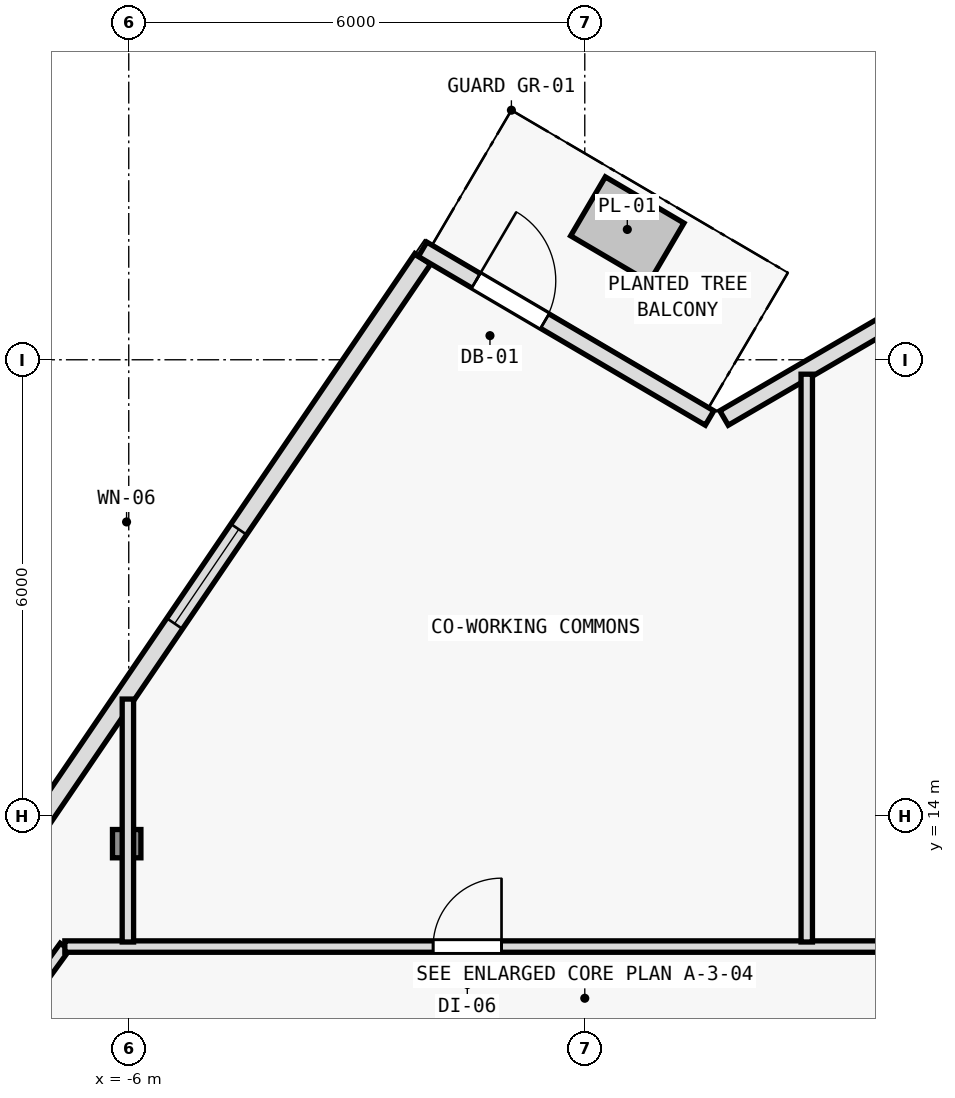
"""IFC4 building model, lengths in metres.
Left out: names, types, materials, properties, quantities, classifications, styles, units other than length and angle.
Written with IfcOpenShell. Run it as: python <this file> out.ifc"""

import sys

from ifc_helpers import new_model, si_unit, direction, frame, frame_2d, origin, origin_2d, place, context, subcontext, project, spatial, rectangle, i_section, extrude, element, fill, save


model = new_model("IFC4")
c1 = context("Model", 3, precision=1e-05, world=origin(), true_north=direction((0.0, 1.0)))
c2 = subcontext(c1, "Body", "Model", "MODEL_VIEW")
j1 = project(units=[si_unit("LENGTHUNIT", "METRE"), si_unit("PLANEANGLEUNIT", "RADIAN")], contexts=[c1])
p1 = place(None, origin())
s1 = spatial("IfcSite", under=j1, at=p1, CompositionType="ELEMENT")
p2 = place(p1, origin())
s2 = spatial("IfcBuilding", under=s1, at=p2, CompositionType="ELEMENT")
p3 = place(p2, frame((0.0, 0.0, 258.0)))
s3 = spatial("IfcBuildingStorey", under=s2, at=p3, CompositionType="ELEMENT", Elevation=258.0)
p4 = place(p3, frame((-6.027, 13.634, 0.006), z_axis=(0.00877514453, -0.002516901919, 0.999958330153), x_axis=(0.275705143097, 0.961242255662, 0.0)))
e1 = element("IfcColumn", 1, at=p4, inside=s3, PredefinedType="COLUMN", context=c2, shape_type="SweptSolid", body=[
    extrude(i_section(OverallWidth=0.374, OverallDepth=0.372, WebThickness=0.012, FlangeThickness=0.02, FilletRadius=0.015, at=origin_2d()), origin(), (0.0, 0.0, 1.0), 3.589),
])
p5 = place(p3, frame((-7.817, 12.971, 0.0), z_axis=(0.0, 0.0, 1.0), x_axis=(0.562474530687, 0.826814611826, 0.0)))
e2 = element("IfcWall", 2, at=p5, inside=s3, PredefinedType="SOLIDWALL", context=c2, shape_type="SweptSolid", body=[
    extrude(rectangle(XDim=10.107, YDim=0.25, at=frame_2d((5.053, 0.0))), origin(), (0.0, 0.0, 1.0), 3.35),
])
p6 = place(p5, frame((4.303, 0.0, 0.62)))
e3 = element("IfcOpeningElement", 3, at=p6, cuts=e2, PredefinedType="OPENING", context=c2, shape_type="SweptSolid", body=[
    extrude(rectangle(XDim=1.5, YDim=2.0, at=frame_2d((0.75, 1.0))), frame((0.0, 0.135, 0.0), z_axis=(0.0, -1.0, 0.0), x_axis=(1.0, 0.0, 0.0)), (0.0, 0.0, 1.0), 0.27),
])
p7 = place(p3, frame((1.832, 19.234, 0.0), z_axis=(0.0, 0.0, 1.0), x_axis=(0.86397765749, 0.503530145432, 0.0)))
e4 = element("IfcWall", 4, at=p7, inside=s3, PredefinedType="SOLIDWALL", context=c2, shape_type="SweptSolid", body=[
    extrude(rectangle(XDim=3.964, YDim=0.22, at=frame_2d((1.982, 0.0))), origin(), (0.0, 0.0, 1.0), 3.35),
])
p8 = place(p3, frame((-2.134, 21.453, 0.0), z_axis=(0.0, 0.0, 1.0), x_axis=(0.862106131527, -0.506727755292, 0.0)))
e5 = element("IfcWall", 5, at=p8, inside=s3, PredefinedType="SOLIDWALL", context=c2, shape_type="SweptSolid", body=[
    extrude(rectangle(XDim=4.38, YDim=0.22, at=frame_2d((2.19, 0.0))), origin(), (0.0, 0.0, 1.0), 3.35),
])
p9 = place(p8, frame((0.815, 0.0, 0.0)))
e6 = element("IfcOpeningElement", 6, at=p9, cuts=e5, PredefinedType="OPENING", context=c2, shape_type="SweptSolid", body=[
    extrude(rectangle(XDim=1.05, YDim=2.15, at=frame_2d((0.525, 1.075))), frame((0.0, 0.12, 0.0), z_axis=(0.0, -1.0, 0.0), x_axis=(1.0, 0.0, 0.0)), (0.0, 0.0, 1.0), 0.24),
])
p10 = place(p3, frame((-9.78, 8.226, 0.0), z_axis=(0.0, 0.0, 1.0), x_axis=(0.586956386413, 0.809618552436, 0.0)))
e7 = element("IfcWall", 7, at=p10, inside=s3, PredefinedType="PARTITIONING", context=c2, shape_type="SweptSolid", body=[
    extrude(rectangle(XDim=5.008, YDim=0.15, at=frame_2d((2.504, 0.0))), origin(), (0.0, 0.0, 1.0), 2.965),
])
p11 = place(p10, frame((1.154, 0.0, 0.0)))
e8 = element("IfcOpeningElement", 8, at=p11, cuts=e7, PredefinedType="OPENING", context=c2, shape_type="SweptSolid", body=[
    extrude(rectangle(XDim=0.9, YDim=2.1, at=frame_2d((0.45, 1.05))), frame((0.0, 0.085, 0.0), z_axis=(0.0, -1.0, 0.0), x_axis=(1.0, 0.0, 0.0)), (0.0, 0.0, 1.0), 0.17),
])
p12 = place(p3, frame((-6.841, 12.28, 0.0), z_axis=(0.0, 0.0, 1.0), x_axis=(1.0, 0.0, 0.0)))
e9 = element("IfcWall", 9, at=p12, inside=s3, PredefinedType="PARTITIONING", context=c2, shape_type="SweptSolid", body=[
    extrude(rectangle(XDim=13.682, YDim=0.15, at=frame_2d((6.841, 0.0))), origin(), (0.0, 0.0, 1.0), 3.015),
])
p13 = place(p12, frame((4.845, 0.0, 0.0)))
e10 = element("IfcOpeningElement", 10, at=p13, cuts=e9, PredefinedType="OPENING", context=c2, shape_type="SweptSolid", body=[
    extrude(rectangle(XDim=0.9, YDim=2.1, at=frame_2d((0.45, 1.05))), frame((0.0, 0.085, 0.0), z_axis=(0.0, -1.0, 0.0), x_axis=(1.0, 0.0, 0.0)), (0.0, 0.0, 1.0), 0.17),
])
p14 = place(p3, frame((-6.011, 12.34, 0.0), z_axis=(0.0, 0.0, 1.0), x_axis=(0.0, 1.0, 0.0)))
e11 = element("IfcWall", 11, at=p14, inside=s3, PredefinedType="PARTITIONING", context=c2, shape_type="SweptSolid", body=[
    extrude(rectangle(XDim=3.196, YDim=0.15, at=frame_2d((1.598, 0.0))), origin(), (0.0, 0.0, 1.0), 3.015),
])
p15 = place(p3, frame((2.92, 12.34, 0.0), z_axis=(0.0, 0.0, 1.0), x_axis=(0.0, 1.0, 0.0)))
e12 = element("IfcWall", 12, at=p15, inside=s3, PredefinedType="PARTITIONING", context=c2, shape_type="SweptSolid", body=[
    extrude(rectangle(XDim=7.47, YDim=0.15, at=frame_2d((3.735, 0.0))), origin(), (0.0, 0.0, 1.0), 3.015),
])
p16 = place(p6, origin())
e13 = element("IfcWindow", 13, at=p16, inside=s3, PartitioningType="SINGLE_PANEL", PredefinedType="WINDOW", context=c2, shape_type="SweptSolid", body=[
    extrude(rectangle(XDim=1.5, YDim=2.0, at=frame_2d((0.75, 1.0))), frame((0.0, 0.03, 0.0), z_axis=(0.0, -1.0, 0.0), x_axis=(1.0, 0.0, 0.0)), (0.0, 0.0, 1.0), 0.06),
])
fill(e3, e13)
p17 = place(p9, origin())
e14 = element("IfcDoor", 14, at=p17, inside=s3, OperationType="SINGLE_SWING_LEFT", PredefinedType="DOOR", context=c2, shape_type="SweptSolid", body=[
    extrude(rectangle(XDim=1.05, YDim=2.15, at=frame_2d((0.525, 1.075))), frame((0.0, 0.025, 0.0), z_axis=(0.0, -1.0, 0.0), x_axis=(1.0, 0.0, 0.0)), (0.0, 0.0, 1.0), 0.05),
])
fill(e6, e14)
p18 = place(p13, origin())
e15 = element("IfcDoor", 15, at=p18, inside=s3, OperationType="SINGLE_SWING_RIGHT", PredefinedType="DOOR", context=c2, shape_type="SweptSolid", body=[
    extrude(rectangle(XDim=0.9, YDim=2.1, at=frame_2d((0.45, 1.05))), frame((0.0, 0.025, 0.0), z_axis=(0.0, -1.0, 0.0), x_axis=(1.0, 0.0, 0.0)), (0.0, 0.0, 1.0), 0.05),
])
fill(e10, e15)
save(model, sys.argv[1])
